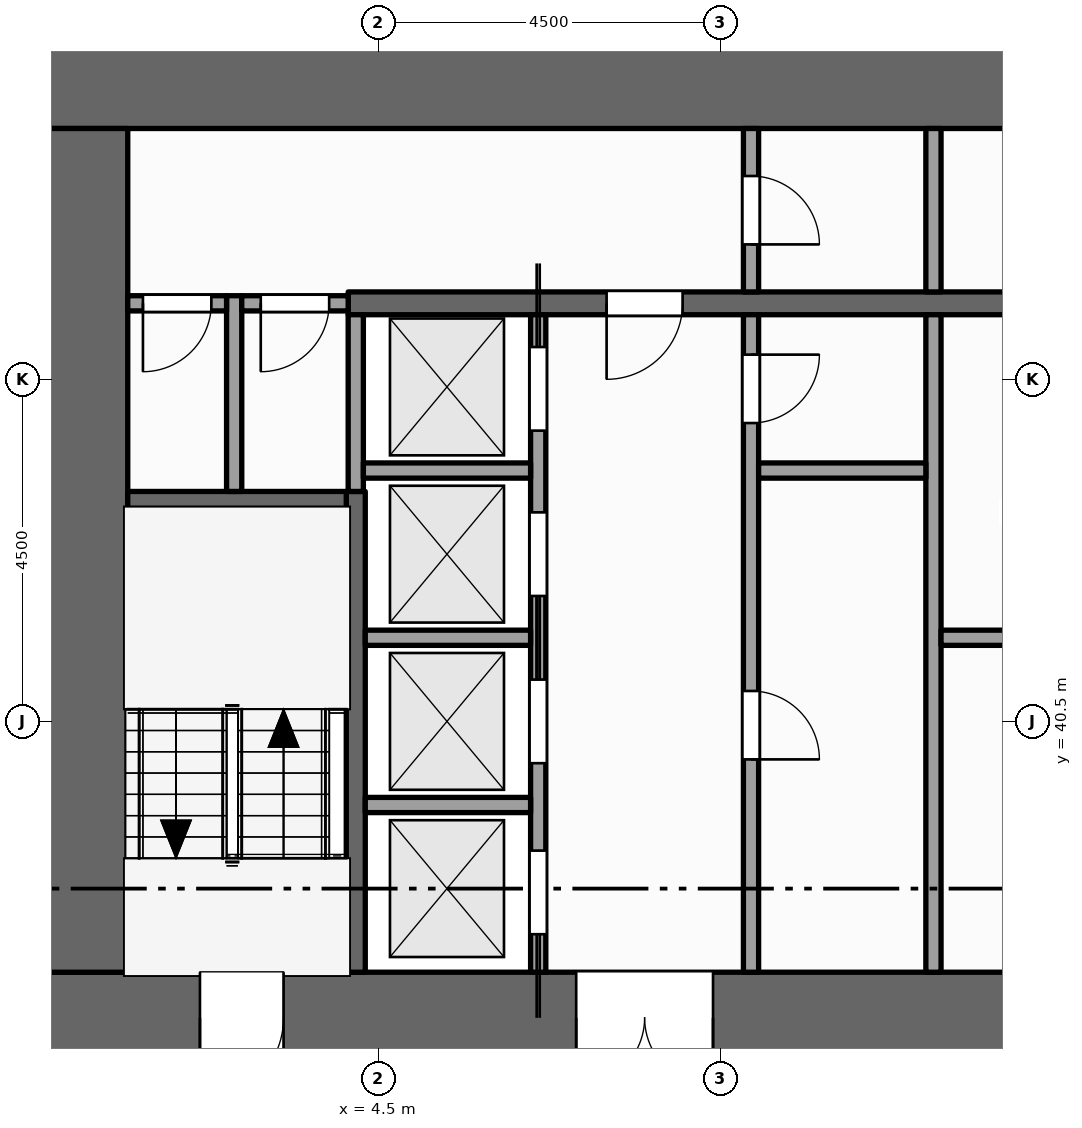
"""IFC4 building model, lengths in metres.
Left out: names, types, materials, properties, quantities, classifications, styles, units other than length and angle.
Written with IfcOpenShell. Run it as: python <this file> out.ifc"""

import sys

from ifc_helpers import new_model, si_unit, direction, frame, frame_2d, origin, place, context, subcontext, project, spatial, rectangle, extrude, element, fill, save


model = new_model("IFC4")
c1 = context("Model", 3, precision=1e-05, world=origin(), true_north=direction((0.0, 1.0)))
c2 = subcontext(c1, "Body", "Model", "MODEL_VIEW")
j1 = project(units=[si_unit("LENGTHUNIT", "METRE"), si_unit("PLANEANGLEUNIT", "RADIAN")], contexts=[c1])
p1 = place(None, origin())
s1 = spatial("IfcSite", under=j1, at=p1, CompositionType="ELEMENT")
p2 = place(p1, origin())
s2 = spatial("IfcBuilding", under=s1, at=p2, CompositionType="ELEMENT")
p3 = place(p2, frame((0.0, 0.0, 19.0)))
s3 = spatial("IfcBuildingStorey", under=s2, at=p3, CompositionType="ELEMENT", Elevation=19.0)
p4 = place(p3, frame((0.0, 36.6, -0.15), z_axis=(0.0, 0.0, 1.0), x_axis=(1.0, 0.0, 0.0)))
e1 = element("IfcWall", 1, at=p4, inside=s3, PredefinedType="SHEAR", context=c2, shape_type="SweptSolid", body=[
    extrude(rectangle(XDim=22.5, YDim=1.2, at=frame_2d((11.25, 0.0))), origin(), (0.0, 0.0, 1.0), 5.0),
])
p5 = place(p4, frame((7.1, 0.0, 0.15)))
e2 = element("IfcOpeningElement", 2, at=p5, cuts=e1, PredefinedType="OPENING", context=c2, shape_type="SweptSolid", body=[
    extrude(rectangle(XDim=1.8, YDim=2.1, at=frame_2d((0.9, 1.05))), frame((0.0, 0.61, 0.0), z_axis=(0.0, -1.0, 0.0), x_axis=(1.0, 0.0, 0.0)), (0.0, 0.0, 1.0), 1.22),
])
p6 = place(p4, frame((13.15, 0.0, 0.15)))
e3 = element("IfcOpeningElement", 3, at=p6, cuts=e1, PredefinedType="OPENING", context=c2, shape_type="SweptSolid", body=[
    extrude(rectangle(XDim=1.1, YDim=2.1, at=frame_2d((0.55, 1.05))), frame((0.0, 0.61, 0.0), z_axis=(0.0, -1.0, 0.0), x_axis=(1.0, 0.0, 0.0)), (0.0, 0.0, 1.0), 1.22),
])
p7 = place(p4, frame((2.15, 0.0, 0.15)))
e4 = element("IfcOpeningElement", 4, at=p7, cuts=e1, PredefinedType="OPENING", context=c2, shape_type="SweptSolid", body=[
    extrude(rectangle(XDim=1.1, YDim=2.1, at=frame_2d((0.55, 1.05))), frame((0.0, 0.61, 0.0), z_axis=(0.0, -1.0, 0.0), x_axis=(1.0, 0.0, 0.0)), (0.0, 0.0, 1.0), 1.22),
])
p8 = place(p4, frame((19.35, 0.0, 0.15)))
e5 = element("IfcOpeningElement", 5, at=p8, cuts=e1, PredefinedType="OPENING", context=c2, shape_type="SweptSolid", body=[
    extrude(rectangle(XDim=1.1, YDim=2.1, at=frame_2d((0.55, 1.05))), frame((0.0, 0.61, 0.0), z_axis=(0.0, -1.0, 0.0), x_axis=(1.0, 0.0, 0.0)), (0.0, 0.0, 1.0), 1.22),
])
p9 = place(p3, frame((0.0, 48.9, -0.15), z_axis=(0.0, 0.0, 1.0), x_axis=(1.0, 0.0, 0.0)))
e6 = element("IfcWall", 6, at=p9, inside=s3, PredefinedType="SHEAR", context=c2, shape_type="SweptSolid", body=[
    extrude(rectangle(XDim=22.5, YDim=1.2, at=frame_2d((11.25, 0.0))), origin(), (0.0, 0.0, 1.0), 5.0),
])
p10 = place(p3, frame((0.6, 37.2, -0.15), z_axis=(0.0, 0.0, 1.0), x_axis=(0.0, 1.0, 0.0)))
e7 = element("IfcWall", 7, at=p10, inside=s3, PredefinedType="SHEAR", context=c2, shape_type="SweptSolid", body=[
    extrude(rectangle(XDim=11.1, YDim=1.2, at=frame_2d((5.55, 0.0))), origin(), (0.0, 0.0, 1.0), 5.0),
])
p11 = place(p3, frame((2.6, 43.525, 0.0), z_axis=(0.0, 0.0, 1.0), x_axis=(0.0, 1.0, 0.0)))
e8 = element("IfcWall", 8, at=p11, inside=s3, PredefinedType="PARTITIONING", context=c2, shape_type="SweptSolid", body=[
    extrude(rectangle(XDim=2.575, YDim=0.2, at=frame_2d((1.288, 0.0))), origin(), (0.0, 0.0, 1.0), 4.75),
])
p12 = place(p3, frame((4.2, 37.2, 0.0), z_axis=(0.0, 0.0, 1.0), x_axis=(0.0, 1.0, 0.0)))
e9 = element("IfcWall", 9, at=p12, inside=s3, PredefinedType="SHEAR", context=c2, shape_type="SweptSolid", body=[
    extrude(rectangle(XDim=6.325, YDim=0.25, at=frame_2d((3.163, 0.0))), origin(), (0.0, 0.0, 1.0), 4.75),
])
p13 = place(p3, frame((4.2, 43.525, 0.0), z_axis=(0.0, 0.0, 1.0), x_axis=(0.0, 1.0, 0.0)))
e10 = element("IfcWall", 10, at=p13, inside=s3, PredefinedType="SOLIDWALL", context=c2, shape_type="SweptSolid", body=[
    extrude(rectangle(XDim=2.325, YDim=0.2, at=frame_2d((1.163, 0.0))), origin(), (0.0, 0.0, 1.0), 4.75),
])
p14 = place(p3, frame((6.6, 37.2, 0.0), z_axis=(0.0, 0.0, 1.0), x_axis=(0.0, 1.0, 0.0)))
e11 = element("IfcWall", 11, at=p14, inside=s3, PredefinedType="SOLIDWALL", context=c2, shape_type="SweptSolid", body=[
    extrude(rectangle(XDim=8.65, YDim=0.2, at=frame_2d((4.325, 0.0))), origin(), (0.0, 0.0, 1.0), 4.75),
])
p15 = place(p14, frame((0.5, 0.0, 0.012)))
e12 = element("IfcOpeningElement", 12, at=p15, cuts=e11, PredefinedType="OPENING", context=c2, shape_type="SweptSolid", body=[
    extrude(rectangle(XDim=1.1, YDim=2.1, at=frame_2d((0.55, 1.05))), frame((0.0, 0.11, 0.0), z_axis=(0.0, -1.0, 0.0), x_axis=(1.0, 0.0, 0.0)), (0.0, 0.0, 1.0), 0.22),
])
p16 = place(p14, frame((2.75, 0.0, 0.012)))
e13 = element("IfcOpeningElement", 13, at=p16, cuts=e11, PredefinedType="OPENING", context=c2, shape_type="SweptSolid", body=[
    extrude(rectangle(XDim=1.1, YDim=2.1, at=frame_2d((0.55, 1.05))), frame((0.0, 0.11, 0.0), z_axis=(0.0, -1.0, 0.0), x_axis=(1.0, 0.0, 0.0)), (0.0, 0.0, 1.0), 0.22),
])
p17 = place(p14, frame((4.95, 0.0, 0.012)))
e14 = element("IfcOpeningElement", 14, at=p17, cuts=e11, PredefinedType="OPENING", context=c2, shape_type="SweptSolid", body=[
    extrude(rectangle(XDim=1.1, YDim=2.1, at=frame_2d((0.55, 1.05))), frame((0.0, 0.11, 0.0), z_axis=(0.0, -1.0, 0.0), x_axis=(1.0, 0.0, 0.0)), (0.0, 0.0, 1.0), 0.22),
])
p18 = place(p14, frame((7.125, 0.0, 0.012)))
e15 = element("IfcOpeningElement", 15, at=p18, cuts=e11, PredefinedType="OPENING", context=c2, shape_type="SweptSolid", body=[
    extrude(rectangle(XDim=1.1, YDim=2.1, at=frame_2d((0.55, 1.05))), frame((0.0, 0.11, 0.0), z_axis=(0.0, -1.0, 0.0), x_axis=(1.0, 0.0, 0.0)), (0.0, 0.0, 1.0), 0.22),
])
p19 = place(p3, frame((9.4, 37.2, 0.0), z_axis=(0.0, 0.0, 1.0), x_axis=(0.0, 1.0, 0.0)))
e16 = element("IfcWall", 16, at=p19, inside=s3, PredefinedType="PARTITIONING", context=c2, shape_type="SweptSolid", body=[
    extrude(rectangle(XDim=8.65, YDim=0.2, at=frame_2d((4.325, 0.0))), origin(), (0.0, 0.0, 1.0), 4.75),
])
p20 = place(p19, frame((2.8, 0.0, 0.0)))
e17 = element("IfcOpeningElement", 17, at=p20, cuts=e16, PredefinedType="OPENING", context=c2, shape_type="SweptSolid", body=[
    extrude(rectangle(XDim=0.9, YDim=2.1, at=frame_2d((0.45, 1.05))), frame((0.0, 0.11, 0.0), z_axis=(0.0, -1.0, 0.0), x_axis=(1.0, 0.0, 0.0)), (0.0, 0.0, 1.0), 0.22),
])
p21 = place(p19, frame((7.225, 0.0, 0.0)))
e18 = element("IfcOpeningElement", 18, at=p21, cuts=e16, PredefinedType="OPENING", context=c2, shape_type="SweptSolid", body=[
    extrude(rectangle(XDim=0.9, YDim=2.1, at=frame_2d((0.45, 1.05))), frame((0.0, 0.11, 0.0), z_axis=(0.0, -1.0, 0.0), x_axis=(1.0, 0.0, 0.0)), (0.0, 0.0, 1.0), 0.22),
])
p22 = place(p3, frame((9.4, 46.15, 0.0), z_axis=(0.0, 0.0, 1.0), x_axis=(0.0, 1.0, 0.0)))
e19 = element("IfcWall", 19, at=p22, inside=s3, PredefinedType="PARTITIONING", context=c2, shape_type="SweptSolid", body=[
    extrude(rectangle(XDim=2.15, YDim=0.2, at=frame_2d((1.075, 0.0))), origin(), (0.0, 0.0, 1.0), 4.75),
])
p23 = place(p22, frame((0.625, 0.0, 0.0)))
e20 = element("IfcOpeningElement", 20, at=p23, cuts=e19, PredefinedType="OPENING", context=c2, shape_type="SweptSolid", body=[
    extrude(rectangle(XDim=0.9, YDim=2.1, at=frame_2d((0.45, 1.05))), frame((0.0, 0.11, 0.0), z_axis=(0.0, -1.0, 0.0), x_axis=(1.0, 0.0, 0.0)), (0.0, 0.0, 1.0), 0.22),
])
p24 = place(p3, frame((11.8, 37.2, 0.0), z_axis=(0.0, 0.0, 1.0), x_axis=(0.0, 1.0, 0.0)))
e21 = element("IfcWall", 21, at=p24, inside=s3, PredefinedType="PARTITIONING", context=c2, shape_type="SweptSolid", body=[
    extrude(rectangle(XDim=8.65, YDim=0.2, at=frame_2d((4.325, 0.0))), origin(), (0.0, 0.0, 1.0), 4.75),
])
p25 = place(p3, frame((11.8, 46.15, 0.0), z_axis=(0.0, 0.0, 1.0), x_axis=(0.0, 1.0, 0.0)))
e22 = element("IfcWall", 22, at=p25, inside=s3, PredefinedType="PARTITIONING", context=c2, shape_type="SweptSolid", body=[
    extrude(rectangle(XDim=2.15, YDim=0.2, at=frame_2d((1.075, 0.0))), origin(), (0.0, 0.0, 1.0), 4.75),
])
for number, where, z_axis, x_axis in (
    (23, (4.325, 39.4, 0.0), (0.0, 0.0, 1.0), (1.0, 0.0, 0.0)),
    (24, (4.325, 41.6, 0.0), (0.0, 0.0, 1.0), (1.0, 0.0, 0.0)),
):
    element("IfcWall", number, at=place(p3, frame(where, z_axis=z_axis, x_axis=x_axis)), inside=s3, PredefinedType="SOLIDWALL", context=c2, shape_type="SweptSolid", body=[
        extrude(rectangle(XDim=2.175, YDim=0.2, at=frame_2d((1.087, 0.0))), origin(), (0.0, 0.0, 1.0), 4.75),
    ])
p26 = place(p3, frame((11.9, 41.6, 0.0), z_axis=(0.0, 0.0, 1.0), x_axis=(1.0, 0.0, 0.0)))
e25 = element("IfcWall", 25, at=p26, inside=s3, PredefinedType="PARTITIONING", context=c2, shape_type="SweptSolid", body=[
    extrude(rectangle(XDim=3.6, YDim=0.2, at=frame_2d((1.8, 0.0))), origin(), (0.0, 0.0, 1.0), 4.75),
])
p27 = place(p26, frame((1.3, 0.0, 0.0)))
e26 = element("IfcOpeningElement", 26, at=p27, cuts=e25, PredefinedType="OPENING", context=c2, shape_type="SweptSolid", body=[
    extrude(rectangle(XDim=1.0, YDim=2.1, at=frame_2d((0.5, 1.05))), frame((0.0, 0.11, 0.0), z_axis=(0.0, -1.0, 0.0), x_axis=(1.0, 0.0, 0.0)), (0.0, 0.0, 1.0), 0.22),
])
p28 = place(p3, frame((1.2, 43.4, 0.0), z_axis=(0.0, 0.0, 1.0), x_axis=(1.0, 0.0, 0.0)))
e27 = element("IfcWall", 27, at=p28, inside=s3, PredefinedType="SHEAR", context=c2, shape_type="SweptSolid", body=[
    extrude(rectangle(XDim=2.875, YDim=0.25, at=frame_2d((1.438, 0.0))), origin(), (0.0, 0.0, 1.0), 4.75),
])
p29 = place(p3, frame((4.3, 43.8, 0.0), z_axis=(0.0, 0.0, 1.0), x_axis=(1.0, 0.0, 0.0)))
e28 = element("IfcWall", 28, at=p29, inside=s3, PredefinedType="SOLIDWALL", context=c2, shape_type="SweptSolid", body=[
    extrude(rectangle(XDim=2.2, YDim=0.2, at=frame_2d((1.1, 0.0))), origin(), (0.0, 0.0, 1.0), 4.75),
])
p30 = place(p3, frame((9.5, 43.8, 0.0), z_axis=(0.0, 0.0, 1.0), x_axis=(1.0, 0.0, 0.0)))
e29 = element("IfcWall", 29, at=p30, inside=s3, PredefinedType="PARTITIONING", context=c2, shape_type="SweptSolid", body=[
    extrude(rectangle(XDim=2.2, YDim=0.2, at=frame_2d((1.1, 0.0))), origin(), (0.0, 0.0, 1.0), 4.75),
])
p31 = place(p3, frame((1.2, 46.0, 0.0), z_axis=(0.0, 0.0, 1.0), x_axis=(1.0, 0.0, 0.0)))
e30 = element("IfcWall", 30, at=p31, inside=s3, PredefinedType="PARTITIONING", context=c2, shape_type="SweptSolid", body=[
    extrude(rectangle(XDim=1.3, YDim=0.2, at=frame_2d((0.65, 0.0))), origin(), (0.0, 0.0, 1.0), 4.75),
])
p32 = place(p31, frame((0.2, 0.0, 0.0)))
e31 = element("IfcOpeningElement", 31, at=p32, cuts=e30, PredefinedType="OPENING", context=c2, shape_type="SweptSolid", body=[
    extrude(rectangle(XDim=0.9, YDim=2.1, at=frame_2d((0.45, 1.05))), frame((0.0, 0.11, 0.0), z_axis=(0.0, -1.0, 0.0), x_axis=(1.0, 0.0, 0.0)), (0.0, 0.0, 1.0), 0.22),
])
p33 = place(p3, frame((2.7, 46.0, 0.0), z_axis=(0.0, 0.0, 1.0), x_axis=(1.0, 0.0, 0.0)))
e32 = element("IfcWall", 32, at=p33, inside=s3, PredefinedType="PARTITIONING", context=c2, shape_type="SweptSolid", body=[
    extrude(rectangle(XDim=1.4, YDim=0.2, at=frame_2d((0.7, 0.0))), origin(), (0.0, 0.0, 1.0), 4.75),
])
p34 = place(p33, frame((0.25, 0.0, 0.0)))
e33 = element("IfcOpeningElement", 33, at=p34, cuts=e32, PredefinedType="OPENING", context=c2, shape_type="SweptSolid", body=[
    extrude(rectangle(XDim=0.9, YDim=2.1, at=frame_2d((0.45, 1.05))), frame((0.0, 0.11, 0.0), z_axis=(0.0, -1.0, 0.0), x_axis=(1.0, 0.0, 0.0)), (0.0, 0.0, 1.0), 0.22),
])
p35 = place(p3, frame((4.1, 46.0, 0.0), z_axis=(0.0, 0.0, 1.0), x_axis=(1.0, 0.0, 0.0)))
e34 = element("IfcWall", 34, at=p35, inside=s3, PredefinedType="SHEAR", context=c2, shape_type="SweptSolid", body=[
    extrude(rectangle(XDim=14.5, YDim=0.3, at=frame_2d((7.25, 0.0))), origin(), (0.0, 0.0, 1.0), 4.75),
])
p36 = place(p35, frame((3.4, 0.0, 0.0)))
e35 = element("IfcOpeningElement", 35, at=p36, cuts=e34, PredefinedType="OPENING", context=c2, shape_type="SweptSolid", body=[
    extrude(rectangle(XDim=1.0, YDim=2.1, at=frame_2d((0.5, 1.05))), frame((0.0, 0.16, 0.0), z_axis=(0.0, -1.0, 0.0), x_axis=(1.0, 0.0, 0.0)), (0.0, 0.0, 1.0), 0.32),
])
p37 = place(p35, frame((9.1, 0.0, 0.0)))
e36 = element("IfcOpeningElement", 36, at=p37, cuts=e34, PredefinedType="OPENING", context=c2, shape_type="SweptSolid", body=[
    extrude(rectangle(XDim=1.0, YDim=2.1, at=frame_2d((0.5, 1.05))), frame((0.0, 0.16, 0.0), z_axis=(0.0, -1.0, 0.0), x_axis=(1.0, 0.0, 0.0)), (0.0, 0.0, 1.0), 0.32),
])
p38 = place(p15, origin())
e37 = element("IfcDoor", 37, at=p38, inside=s3, OperationType="SLIDING_TO_LEFT", PredefinedType="DOOR", context=c2, shape_type="SweptSolid", body=[
    extrude(rectangle(XDim=1.1, YDim=2.1, at=frame_2d((0.55, 1.05))), frame((0.0, 0.025, 0.0), z_axis=(0.0, -1.0, 0.0), x_axis=(1.0, 0.0, 0.0)), (0.0, 0.0, 1.0), 0.05),
])
fill(e12, e37)
p39 = place(p16, origin())
e38 = element("IfcDoor", 38, at=p39, inside=s3, OperationType="SLIDING_TO_RIGHT", PredefinedType="DOOR", context=c2, shape_type="SweptSolid", body=[
    extrude(rectangle(XDim=1.1, YDim=2.1, at=frame_2d((0.55, 1.05))), frame((0.0, 0.025, 0.0), z_axis=(0.0, -1.0, 0.0), x_axis=(1.0, 0.0, 0.0)), (0.0, 0.0, 1.0), 0.05),
])
fill(e13, e38)
p40 = place(p17, origin())
e39 = element("IfcDoor", 39, at=p40, inside=s3, OperationType="SLIDING_TO_LEFT", PredefinedType="DOOR", context=c2, shape_type="SweptSolid", body=[
    extrude(rectangle(XDim=1.1, YDim=2.1, at=frame_2d((0.55, 1.05))), frame((0.0, 0.025, 0.0), z_axis=(0.0, -1.0, 0.0), x_axis=(1.0, 0.0, 0.0)), (0.0, 0.0, 1.0), 0.05),
])
fill(e14, e39)
p41 = place(p18, origin())
e40 = element("IfcDoor", 40, at=p41, inside=s3, OperationType="SLIDING_TO_RIGHT", PredefinedType="DOOR", context=c2, shape_type="SweptSolid", body=[
    extrude(rectangle(XDim=1.1, YDim=2.1, at=frame_2d((0.55, 1.05))), frame((0.0, 0.025, 0.0), z_axis=(0.0, -1.0, 0.0), x_axis=(1.0, 0.0, 0.0)), (0.0, 0.0, 1.0), 0.05),
])
fill(e15, e40)
p42 = place(p5, origin())
e41 = element("IfcDoor", 41, at=p42, inside=s3, OperationType="DOUBLE_DOOR_SINGLE_SWING", PredefinedType="DOOR", context=c2, shape_type="SweptSolid", body=[
    extrude(rectangle(XDim=1.8, YDim=2.1, at=frame_2d((0.9, 1.05))), frame((0.0, 0.025, 0.0), z_axis=(0.0, -1.0, 0.0), x_axis=(1.0, 0.0, 0.0)), (0.0, 0.0, 1.0), 0.05),
])
fill(e2, e41)
p43 = place(p36, origin())
e42 = element("IfcDoor", 42, at=p43, inside=s3, OperationType="SINGLE_SWING_LEFT", PredefinedType="DOOR", context=c2, shape_type="SweptSolid", body=[
    extrude(rectangle(XDim=1.0, YDim=2.1, at=frame_2d((0.5, 1.05))), frame((0.0, 0.025, 0.0), z_axis=(0.0, -1.0, 0.0), x_axis=(1.0, 0.0, 0.0)), (0.0, 0.0, 1.0), 0.05),
])
fill(e35, e42)
p44 = place(p23, origin())
e43 = element("IfcDoor", 43, at=p44, inside=s3, OperationType="SINGLE_SWING_LEFT", PredefinedType="DOOR", context=c2, shape_type="SweptSolid", body=[
    extrude(rectangle(XDim=0.9, YDim=2.1, at=frame_2d((0.45, 1.05))), frame((0.0, 0.025, 0.0), z_axis=(0.0, -1.0, 0.0), x_axis=(1.0, 0.0, 0.0)), (0.0, 0.0, 1.0), 0.05),
])
fill(e20, e43)
p45 = place(p7, origin())
e44 = element("IfcDoor", 44, at=p45, inside=s3, OperationType="SINGLE_SWING_LEFT", PredefinedType="DOOR", context=c2, shape_type="SweptSolid", body=[
    extrude(rectangle(XDim=1.1, YDim=2.1, at=frame_2d((0.55, 1.05))), frame((0.0, 0.025, 0.0), z_axis=(0.0, -1.0, 0.0), x_axis=(1.0, 0.0, 0.0)), (0.0, 0.0, 1.0), 0.05),
])
fill(e4, e44)
p46 = place(p32, origin())
e45 = element("IfcDoor", 45, at=p46, inside=s3, OperationType="SINGLE_SWING_LEFT", PredefinedType="DOOR", context=c2, shape_type="SweptSolid", body=[
    extrude(rectangle(XDim=0.9, YDim=2.1, at=frame_2d((0.45, 1.05))), frame((0.0, 0.025, 0.0), z_axis=(0.0, -1.0, 0.0), x_axis=(1.0, 0.0, 0.0)), (0.0, 0.0, 1.0), 0.05),
])
fill(e31, e45)
p47 = place(p34, origin())
e46 = element("IfcDoor", 46, at=p47, inside=s3, OperationType="SINGLE_SWING_LEFT", PredefinedType="DOOR", context=c2, shape_type="SweptSolid", body=[
    extrude(rectangle(XDim=0.9, YDim=2.1, at=frame_2d((0.45, 1.05))), frame((0.0, 0.025, 0.0), z_axis=(0.0, -1.0, 0.0), x_axis=(1.0, 0.0, 0.0)), (0.0, 0.0, 1.0), 0.05),
])
fill(e33, e46)
p48 = place(p20, origin())
e47 = element("IfcDoor", 47, at=p48, inside=s3, OperationType="SINGLE_SWING_LEFT", PredefinedType="DOOR", context=c2, shape_type="SweptSolid", body=[
    extrude(rectangle(XDim=0.9, YDim=2.1, at=frame_2d((0.45, 1.05))), frame((0.0, 0.025, 0.0), z_axis=(0.0, -1.0, 0.0), x_axis=(1.0, 0.0, 0.0)), (0.0, 0.0, 1.0), 0.05),
])
fill(e17, e47)
p49 = place(p21, origin())
e48 = element("IfcDoor", 48, at=p49, inside=s3, OperationType="SINGLE_SWING_RIGHT", PredefinedType="DOOR", context=c2, shape_type="SweptSolid", body=[
    extrude(rectangle(XDim=0.9, YDim=2.1, at=frame_2d((0.45, 1.05))), frame((0.0, 0.025, 0.0), z_axis=(0.0, -1.0, 0.0), x_axis=(1.0, 0.0, 0.0)), (0.0, 0.0, 1.0), 0.05),
])
fill(e18, e48)
save(model, sys.argv[1])
